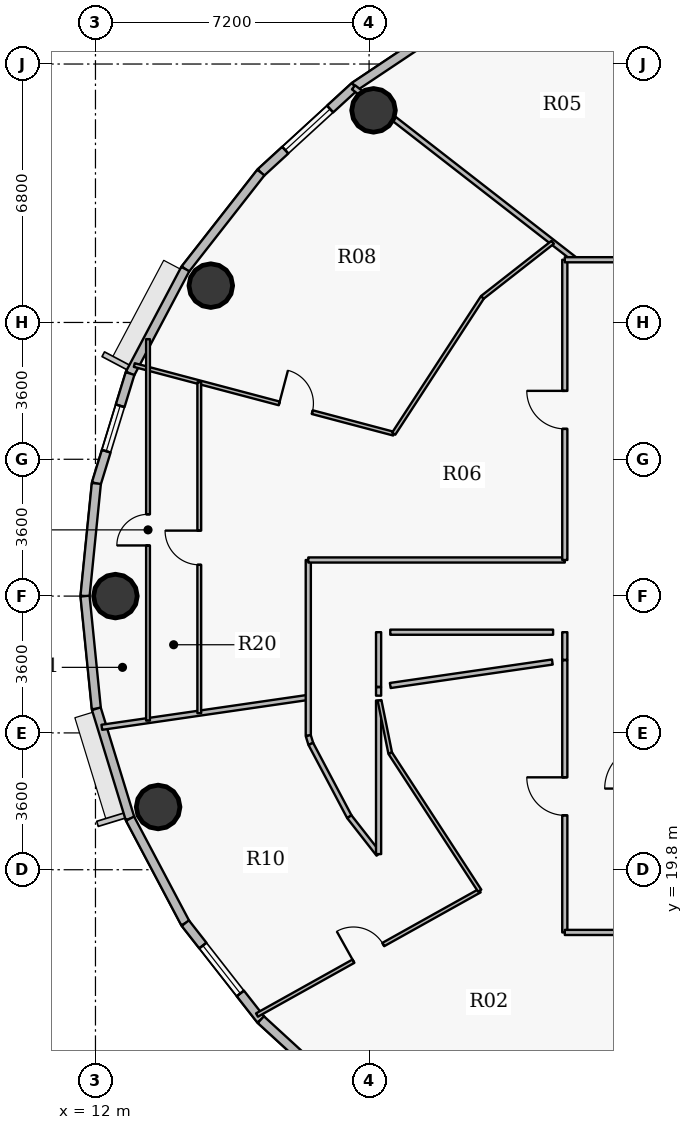
"""IFC4 building model, lengths in metres.
Left out: names, types, materials, properties, quantities, classifications, styles, units other than length and angle.
Written with IfcOpenShell. Run it as: python <this file> out.ifc"""

import sys

from ifc_helpers import new_model, si_unit, direction, frame, frame_2d, origin, origin_2d, place, context, subcontext, project, spatial, rectangle, hollow_circle, extrude, source, transform, mapped, element, fill, save


model = new_model("IFC4")
c1 = context("Model", 3, precision=1e-05, world=origin(), true_north=direction((0.0, 1.0)))
c2 = subcontext(c1, "Body", "Model", "MODEL_VIEW")
j1 = project(units=[si_unit("LENGTHUNIT", "METRE"), si_unit("PLANEANGLEUNIT", "RADIAN")], contexts=[c1])
p1 = place(None, origin())
s1 = spatial("IfcSite", under=j1, at=p1, CompositionType="ELEMENT")
p2 = place(p1, origin())
s2 = spatial("IfcBuilding", under=s1, at=p2, CompositionType="ELEMENT")
p3 = place(p2, frame((0.0, 0.0, 236.55)))
s3 = spatial("IfcBuildingStorey", under=s2, at=p3, CompositionType="ELEMENT", Elevation=236.55)
for number, where, z_axis, x_axis in (
    (1, (19.317, 39.781, 0.0), (0.0, 0.0, 1.0), (1.0, 0.0, 0.0)),
    (2, (15.035, 35.169, 0.0), (0.0, 0.0, 1.0), (1.0, 0.0, 0.0)),
    (3, (12.525, 27.0, 0.0), (0.0, 0.0, 1.0), (1.0, 0.0, 0.0)),
    (4, (13.649, 21.451, 0.0), (0.0, 0.0, 1.0), (1.0, 0.0, 0.0)),
):
    element("IfcColumn", number, at=place(p3, frame(where, z_axis=z_axis, x_axis=x_axis)), inside=s3, PredefinedType="COLUMN", context=c2, shape_type="SweptSolid", body=[
        extrude(hollow_circle(Radius=0.575, WallThickness=0.036, at=origin_2d()), origin(), (0.0, 0.0, 1.0), 3.75),
    ])
p4 = place(p3, frame((18.824, 40.411, 0.0), z_axis=(0.0, 0.0, 1.0), x_axis=(0.831262496074, 0.555880079352, 0.0)))
e5 = element("IfcWall", 5, at=p4, inside=s3, PredefinedType="SOLIDWALL", context=c2, shape_type="SweptSolid", body=[
    extrude(rectangle(XDim=3.484, YDim=0.24, at=frame_2d((1.742, 0.0))), origin(), (0.0, 0.0, 1.0), 3.5),
])
p5 = place(p3, frame((16.352, 38.145, 0.0), z_axis=(0.0, 0.0, 1.0), x_axis=(0.737123922599, 0.675757591694, 0.0)))
e6 = element("IfcWall", 6, at=p5, inside=s3, PredefinedType="SOLIDWALL", context=c2, shape_type="SweptSolid", body=[
    extrude(rectangle(XDim=3.354, YDim=0.24, at=frame_2d((1.677, 0.0))), origin(), (0.0, 0.0, 1.0), 3.5),
])
p6 = place(p5, frame((0.873, 0.0, 0.9)))
e7 = element("IfcOpeningElement", 7, at=p6, cuts=e6, PredefinedType="OPENING", context=c2, shape_type="SweptSolid", body=[
    extrude(rectangle(XDim=1.6, YDim=1.75, at=origin_2d()), frame((0.8, 0.13, 0.875), z_axis=(0.0, -1.0, 0.0), x_axis=(1.0, 0.0, 0.0)), (0.0, 0.0, 1.0), 0.26),
])
p7 = place(p3, frame((14.364, 35.605, 0.0), z_axis=(0.0, 0.0, 1.0), x_axis=(0.616312344705, 0.787501805562, 0.0)))
e8 = element("IfcWall", 8, at=p7, inside=s3, PredefinedType="SOLIDWALL", context=c2, shape_type="SweptSolid", body=[
    extrude(rectangle(XDim=3.225, YDim=0.24, at=frame_2d((1.612, 0.0))), origin(), (0.0, 0.0, 1.0), 3.5),
])
p8 = place(p3, frame((12.91, 32.856, 0.0), z_axis=(0.0, 0.0, 1.0), x_axis=(0.46766049993, 0.883908172157, 0.0)))
e9 = element("IfcWall", 9, at=p8, inside=s3, PredefinedType="SOLIDWALL", context=c2, shape_type="SweptSolid", body=[
    extrude(rectangle(XDim=3.11, YDim=0.24, at=frame_2d((1.555, 0.0))), origin(), (0.0, 0.0, 1.0), 3.5),
])
p9 = place(p3, frame((12.023, 29.964, 0.0), z_axis=(0.0, 0.0, 1.0), x_axis=(0.293132907334, 0.95607170162, 0.0)))
e10 = element("IfcWall", 10, at=p9, inside=s3, PredefinedType="SOLIDWALL", context=c2, shape_type="SweptSolid", body=[
    extrude(rectangle(XDim=3.025, YDim=0.24, at=frame_2d((1.512, 0.0))), origin(), (0.0, 0.0, 1.0), 3.5),
])
p10 = place(p9, frame((0.887, 0.0, 0.9)))
e11 = element("IfcOpeningElement", 11, at=p10, cuts=e10, PredefinedType="OPENING", context=c2, shape_type="SweptSolid", body=[
    extrude(rectangle(XDim=1.25, YDim=1.65, at=origin_2d()), frame((0.625, 0.13, 0.825), z_axis=(0.0, -1.0, 0.0), x_axis=(1.0, 0.0, 0.0)), (0.0, 0.0, 1.0), 0.26),
])
for number, where, z_axis, x_axis in (
    (12, (11.725, 27.0, 0.0), (0.0, 0.0, 1.0), (0.1, 0.995, 0.0)),
    (13, (12.023, 24.036, 0.0), (0.0, 0.0, 1.0), (-0.1, 0.995, 0.0)),
):
    element("IfcWall", number, at=place(p3, frame(where, z_axis=z_axis, x_axis=x_axis)), inside=s3, PredefinedType="SOLIDWALL", context=c2, shape_type="SweptSolid", body=[
        extrude(rectangle(XDim=2.979, YDim=0.24, at=frame_2d((1.489, 0.0))), origin(), (0.0, 0.0, 1.0), 3.5),
    ])
p11 = place(p3, frame((12.91, 21.144, 0.0), z_axis=(0.0, 0.0, 1.0), x_axis=(-0.293132907334, 0.95607170162, 0.0)))
e14 = element("IfcWall", 14, at=p11, inside=s3, PredefinedType="SOLIDWALL", context=c2, shape_type="SweptSolid", body=[
    extrude(rectangle(XDim=3.025, YDim=0.24, at=frame_2d((1.512, 0.0))), origin(), (0.0, 0.0, 1.0), 3.5),
])
p12 = place(p3, frame((14.364, 18.395, 0.0), z_axis=(0.0, 0.0, 1.0), x_axis=(-0.46766049993, 0.883908172157, 0.0)))
e15 = element("IfcWall", 15, at=p12, inside=s3, PredefinedType="SOLIDWALL", context=c2, shape_type="SweptSolid", body=[
    extrude(rectangle(XDim=3.11, YDim=0.24, at=frame_2d((1.555, 0.0))), origin(), (0.0, 0.0, 1.0), 3.5),
])
p13 = place(p3, frame((16.352, 15.855, 0.0), z_axis=(0.0, 0.0, 1.0), x_axis=(-0.616312344705, 0.787501805562, 0.0)))
e16 = element("IfcWall", 16, at=p13, inside=s3, PredefinedType="SOLIDWALL", context=c2, shape_type="SweptSolid", body=[
    extrude(rectangle(XDim=3.225, YDim=0.24, at=frame_2d((1.612, 0.0))), origin(), (0.0, 0.0, 1.0), 3.5),
])
p14 = place(p13, frame((0.876, 0.0, 0.9)))
e17 = element("IfcOpeningElement", 17, at=p14, cuts=e16, PredefinedType="OPENING", context=c2, shape_type="SweptSolid", body=[
    extrude(rectangle(XDim=1.6, YDim=1.75, at=origin_2d()), frame((0.8, 0.13, 0.875), z_axis=(0.0, -1.0, 0.0), x_axis=(1.0, 0.0, 0.0)), (0.0, 0.0, 1.0), 0.26),
])
p15 = place(p3, frame((18.824, 13.589, 0.0), z_axis=(0.0, 0.0, 1.0), x_axis=(-0.737123922599, 0.675757591694, 0.0)))
e18 = element("IfcWall", 18, at=p15, inside=s3, PredefinedType="SOLIDWALL", context=c2, shape_type="SweptSolid", body=[
    extrude(rectangle(XDim=3.354, YDim=0.24, at=frame_2d((1.677, 0.0))), origin(), (0.0, 0.0, 1.0), 3.5),
])
p16 = place(p3, frame((12.167, 23.548, 0.0), z_axis=(0.0, 0.0, 1.0), x_axis=(0.989672764262, 0.143345106921, 0.0)))
e19 = element("IfcWall", 19, at=p16, inside=s3, PredefinedType="PARTITIONING", context=c2, shape_type="SweptSolid", body=[
    extrude(rectangle(XDim=5.489, YDim=0.135, at=frame_2d((2.745, 0.0))), origin(), (0.0, 0.0, 1.0), 2.985),
])
p17 = place(p3, frame((13.022, 33.079, 0.0), z_axis=(0.0, 0.0, 1.0), x_axis=(0.966904841433, -0.255137272097, 0.0)))
e20 = element("IfcWall", 20, at=p17, inside=s3, PredefinedType="PARTITIONING", context=c2, shape_type="SweptSolid", body=[
    extrude(rectangle(XDim=0.373, YDim=0.1, at=frame_2d((0.187, 0.0))), origin(), (0.0, 0.0, 1.0), 3.5),
])
p18 = place(p3, frame((13.392, 32.981, 0.0), z_axis=(0.0, 0.0, 1.0), x_axis=(0.966739802164, -0.255761910595, 0.0)))
e21 = element("IfcWall", 21, at=p18, inside=s3, PredefinedType="PARTITIONING", context=c2, shape_type="SweptSolid", body=[
    extrude(rectangle(XDim=6.677, YDim=0.1, at=frame_2d((3.339, 0.0))), origin(), (0.0, 0.0, 1.0), 2.985),
])
p19 = place(p18, frame((3.561, 0.0, 0.0)))
e22 = element("IfcOpeningElement", 22, at=p19, cuts=e21, PredefinedType="OPENING", context=c2, shape_type="SweptSolid", body=[
    extrude(rectangle(XDim=0.9, YDim=2.1, at=origin_2d()), frame((0.45, 0.06, 1.05), z_axis=(0.0, -1.0, 0.0), x_axis=(1.0, 0.0, 0.0)), (0.0, 0.0, 1.0), 0.12),
])
p20 = place(p3, frame((13.383, 23.724, 0.0), z_axis=(0.0, 0.0, 1.0), x_axis=(0.0, 1.0, 0.0)))
e23 = element("IfcWall", 23, at=p20, inside=s3, PredefinedType="PARTITIONING", context=c2, shape_type="SweptSolid", body=[
    extrude(rectangle(XDim=10.037, YDim=0.1, at=frame_2d((5.019, 0.0))), origin(), (0.0, 0.0, 1.0), 2.935),
])
p21 = place(p20, frame((4.608, 0.0, 0.0)))
e24 = element("IfcOpeningElement", 24, at=p21, cuts=e23, PredefinedType="OPENING", context=c2, shape_type="SweptSolid", body=[
    extrude(rectangle(XDim=0.82, YDim=2.1, at=origin_2d()), frame((0.41, 0.06, 1.05), z_axis=(0.0, -1.0, 0.0), x_axis=(1.0, 0.0, 0.0)), (0.0, 0.0, 1.0), 0.12),
])
p22 = place(p3, frame((14.732, 23.919, 0.0), z_axis=(0.0, 0.0, 1.0), x_axis=(0.0, 1.0, 0.0)))
e25 = element("IfcWall", 25, at=p22, inside=s3, PredefinedType="PARTITIONING", context=c2, shape_type="SweptSolid", body=[
    extrude(rectangle(XDim=8.708, YDim=0.1, at=frame_2d((4.354, 0.0))), origin(), (0.0, 0.0, 1.0), 2.935),
])
p23 = place(p22, frame((3.904, 0.0, 0.0)))
e26 = element("IfcOpeningElement", 26, at=p23, cuts=e25, PredefinedType="OPENING", context=c2, shape_type="SweptSolid", body=[
    extrude(rectangle(XDim=0.9, YDim=2.1, at=origin_2d()), frame((0.45, 0.06, 1.05), z_axis=(0.0, -1.0, 0.0), x_axis=(1.0, 0.0, 0.0)), (0.0, 0.0, 1.0), 0.12),
])
p24 = place(p3, frame((16.25, 15.977, 0.0), z_axis=(0.0, 0.0, 1.0), x_axis=(0.87319302211, 0.487374543999, 0.0)))
e27 = element("IfcWall", 27, at=p24, inside=s3, PredefinedType="PARTITIONING", context=c2, shape_type="SweptSolid", body=[
    extrude(rectangle(XDim=6.712, YDim=0.1, at=frame_2d((3.356, 0.0))), origin(), (0.0, 0.0, 1.0), 2.985),
])
p25 = place(p24, frame((2.906, 0.0, 0.0)))
e28 = element("IfcOpeningElement", 28, at=p25, cuts=e27, PredefinedType="OPENING", context=c2, shape_type="SweptSolid", body=[
    extrude(rectangle(XDim=0.9, YDim=2.1, at=origin_2d()), frame((0.45, 0.06, 1.05), z_axis=(0.0, -1.0, 0.0), x_axis=(1.0, 0.0, 0.0)), (0.0, 0.0, 1.0), 0.12),
])
p26 = place(p3, frame((17.6, 23.328, 0.0), z_axis=(0.0, 0.0, 1.0), x_axis=(0.0, 1.0, 0.0)))
e29 = element("IfcWall", 29, at=p26, inside=s3, PredefinedType="PARTITIONING", context=c2, shape_type="SweptSolid", body=[
    extrude(rectangle(XDim=4.622, YDim=0.135, at=frame_2d((2.311, 0.0))), origin(), (0.0, 0.0, 1.0), 2.935),
])
p27 = place(p3, frame((17.6, 23.328, 0.0), z_axis=(0.0, 0.0, 1.0), x_axis=(0.292875000845, -0.956150738053, 0.0)))
e30 = element("IfcWall", 30, at=p27, inside=s3, PredefinedType="PARTITIONING", context=c2, shape_type="SweptSolid", body=[
    extrude(rectangle(XDim=0.227, YDim=0.135, at=frame_2d((0.113, 0.0))), origin(), (0.0, 0.0, 1.0), 3.5),
])
p28 = place(p3, frame((17.6, 27.95, 0.0), z_axis=(0.0, 0.0, 1.0), x_axis=(1.0, 0.0, 0.0)))
e31 = element("IfcWall", 31, at=p28, inside=s3, PredefinedType="PARTITIONING", context=c2, shape_type="SweptSolid", body=[
    extrude(rectangle(XDim=6.75, YDim=0.135, at=frame_2d((3.375, 0.0))), origin(), (0.0, 0.0, 1.0), 3.5),
])
p29 = place(p3, frame((17.667, 23.111, 0.0), z_axis=(0.0, 0.0, 1.0), x_axis=(0.467675622269, -0.883900171024, 0.0)))
e32 = element("IfcWall", 32, at=p29, inside=s3, PredefinedType="PARTITIONING", context=c2, shape_type="SweptSolid", body=[
    extrude(rectangle(XDim=2.168, YDim=0.135, at=frame_2d((1.084, 0.0))), origin(), (0.0, 0.0, 1.0), 2.935),
])
p30 = place(p3, frame((18.681, 21.194, 0.0), z_axis=(0.0, 0.0, 1.0), x_axis=(0.616239706802, -0.787558647823, 0.0)))
e33 = element("IfcWall", 33, at=p30, inside=s3, PredefinedType="PARTITIONING", context=c2, shape_type="SweptSolid", body=[
    extrude(rectangle(XDim=1.248, YDim=0.135, at=frame_2d((0.624, 0.0))), origin(), (0.0, 0.0, 1.0), 3.5),
])
p31 = place(p3, frame((18.791, 40.387, 0.0), z_axis=(0.0, 0.0, 1.0), x_axis=(0.789302404173, -0.614004653701, 0.0)))
e34 = element("IfcWall", 34, at=p31, inside=s3, PredefinedType="PARTITIONING", context=c2, shape_type="SweptSolid", body=[
    extrude(rectangle(XDim=7.39, YDim=0.135, at=frame_2d((3.695, 0.0))), origin(), (0.0, 0.0, 1.0), 2.935),
])
p32 = place(p3, frame((19.45, 20.211, 0.0), z_axis=(0.0, 0.0, 1.0), x_axis=(0.0, 1.0, 0.0)))
e35 = element("IfcWall", 35, at=p32, inside=s3, PredefinedType="PARTITIONING", context=c2, shape_type="SweptSolid", body=[
    extrude(rectangle(XDim=4.042, YDim=0.135, at=frame_2d((2.021, 0.0))), origin(), (0.0, 0.0, 1.0), 2.935),
])
p33 = place(p3, frame((19.45, 24.38, 0.0), z_axis=(0.0, 0.0, 1.0), x_axis=(0.0, 1.0, 0.0)))
e36 = element("IfcWall", 36, at=p33, inside=s3, PredefinedType="PARTITIONING", context=c2, shape_type="SweptSolid", body=[
    extrude(rectangle(XDim=0.223, YDim=0.135, at=frame_2d((0.111, 0.0))), origin(), (0.0, 0.0, 1.0), 3.5),
])
p34 = place(p3, frame((19.475, 24.256, 0.0), z_axis=(0.0, 0.0, 1.0), x_axis=(0.198203790622, -0.980160832406, 0.0)))
e37 = element("IfcWall", 37, at=p34, inside=s3, PredefinedType="PARTITIONING", context=c2, shape_type="SweptSolid", body=[
    extrude(rectangle(XDim=1.417, YDim=0.1, at=frame_2d((0.708, 0.0))), origin(), (0.0, 0.0, 1.0), 2.935),
])
p35 = place(p3, frame((19.756, 22.867, 0.0), z_axis=(0.0, 0.0, 1.0), x_axis=(0.545441385955, -0.83814896915, 0.0)))
e38 = element("IfcWall", 38, at=p35, inside=s3, PredefinedType="PARTITIONING", context=c2, shape_type="SweptSolid", body=[
    extrude(rectangle(XDim=4.318, YDim=0.1, at=frame_2d((2.159, 0.0))), origin(), (0.0, 0.0, 1.0), 2.935),
])
p36 = place(p3, frame((19.847, 31.273, 0.0), z_axis=(0.0, 0.0, 1.0), x_axis=(0.545399280946, 0.83817636828, 0.0)))
e39 = element("IfcWall", 39, at=p36, inside=s3, PredefinedType="PARTITIONING", context=c2, shape_type="SweptSolid", body=[
    extrude(rectangle(XDim=4.28, YDim=0.1, at=frame_2d((2.14, 0.0))), origin(), (0.0, 0.0, 1.0), 2.935),
])
p37 = place(p3, frame((22.182, 34.861, 0.0), z_axis=(0.0, 0.0, 1.0), x_axis=(0.78737344739, 0.616476320994, 0.0)))
e40 = element("IfcWall", 40, at=p37, inside=s3, PredefinedType="PARTITIONING", context=c2, shape_type="SweptSolid", body=[
    extrude(rectangle(XDim=2.35, YDim=0.1, at=frame_2d((1.175, 0.0))), origin(), (0.0, 0.0, 1.0), 2.935),
])
p38 = place(p3, frame((22.747, 11.154, 0.0), z_axis=(0.0, 0.0, 1.0), x_axis=(0.641565789242, 0.767068013982, 0.0)))
e41 = element("IfcWall", 41, at=p38, inside=s3, PredefinedType="PARTITIONING", context=c2, shape_type="SweptSolid", body=[
    extrude(rectangle(XDim=6.167, YDim=0.1, at=frame_2d((3.083, 0.0))), origin(), (0.0, 0.0, 1.0), 2.985),
])
p39 = place(p38, frame((2.633, 0.0, 0.0)))
e42 = element("IfcOpeningElement", 42, at=p39, cuts=e41, PredefinedType="OPENING", context=c2, shape_type="SweptSolid", body=[
    extrude(rectangle(XDim=0.9, YDim=2.1, at=origin_2d()), frame((0.45, 0.06, 1.05), z_axis=(0.0, -1.0, 0.0), x_axis=(1.0, 0.0, 0.0)), (0.0, 0.0, 1.0), 0.12),
])
p40 = place(p3, frame((24.35, 18.15, 0.0), z_axis=(0.0, 0.0, 1.0), x_axis=(0.0, 1.0, 0.0)))
e43 = element("IfcWall", 43, at=p40, inside=s3, PredefinedType="PARTITIONING", context=c2, shape_type="SweptSolid", body=[
    extrude(rectangle(XDim=7.163, YDim=0.135, at=frame_2d((3.581, 0.0))), origin(), (0.0, 0.0, 1.0), 2.935),
])
p41 = place(p40, frame((3.081, 0.0, 0.0)))
e44 = element("IfcOpeningElement", 44, at=p41, cuts=e43, PredefinedType="OPENING", context=c2, shape_type="SweptSolid", body=[
    extrude(rectangle(XDim=1.0, YDim=2.15, at=origin_2d()), frame((0.5, 0.078, 1.075), z_axis=(0.0, -1.0, 0.0), x_axis=(1.0, 0.0, 0.0)), (0.0, 0.0, 1.0), 0.155),
])
p42 = place(p3, frame((24.35, 18.15, 0.0), z_axis=(0.0, 0.0, 1.0), x_axis=(1.0, 0.0, 0.0)))
e45 = element("IfcWall", 45, at=p42, inside=s3, PredefinedType="PARTITIONING", context=c2, shape_type="SweptSolid", body=[
    extrude(rectangle(XDim=23.85, YDim=0.135, at=frame_2d((11.925, 0.0))), origin(), (0.0, 0.0, 1.0), 2.935),
])
p43 = place(p42, frame((14.838, 0.0, 0.0)))
e46 = element("IfcOpeningElement", 46, at=p43, cuts=e45, PredefinedType="OPENING", context=c2, shape_type="SweptSolid", body=[
    extrude(rectangle(XDim=1.0, YDim=2.15, at=origin_2d()), frame((0.5, 0.078, 1.075), z_axis=(0.0, -1.0, 0.0), x_axis=(1.0, 0.0, 0.0)), (0.0, 0.0, 1.0), 0.155),
])
p44 = place(p42, frame((21.472, 0.0, 0.0)))
e47 = element("IfcOpeningElement", 47, at=p44, cuts=e45, PredefinedType="OPENING", context=c2, shape_type="SweptSolid", body=[
    extrude(rectangle(XDim=1.0, YDim=2.15, at=origin_2d()), frame((0.5, 0.078, 1.075), z_axis=(0.0, -1.0, 0.0), x_axis=(1.0, 0.0, 0.0)), (0.0, 0.0, 1.0), 0.155),
])
p45 = place(p3, frame((24.35, 27.95, 0.0), z_axis=(0.0, 0.0, 1.0), x_axis=(0.0, 1.0, 0.0)))
e48 = element("IfcWall", 48, at=p45, inside=s3, PredefinedType="PARTITIONING", context=c2, shape_type="SweptSolid", body=[
    extrude(rectangle(XDim=7.9, YDim=0.135, at=frame_2d((3.95, 0.0))), origin(), (0.0, 0.0, 1.0), 2.935),
])
p46 = place(p45, frame((3.45, 0.0, 0.0)))
e49 = element("IfcOpeningElement", 49, at=p46, cuts=e48, PredefinedType="OPENING", context=c2, shape_type="SweptSolid", body=[
    extrude(rectangle(XDim=1.0, YDim=2.15, at=origin_2d()), frame((0.5, 0.078, 1.075), z_axis=(0.0, -1.0, 0.0), x_axis=(1.0, 0.0, 0.0)), (0.0, 0.0, 1.0), 0.155),
])
p47 = place(p3, frame((24.35, 35.85, 0.0), z_axis=(0.0, 0.0, 1.0), x_axis=(1.0, 0.0, 0.0)))
e50 = element("IfcWall", 50, at=p47, inside=s3, PredefinedType="PARTITIONING", context=c2, shape_type="SweptSolid", body=[
    extrude(rectangle(XDim=26.218, YDim=0.135, at=frame_2d((13.109, 0.0))), origin(), (0.0, 0.0, 1.0), 2.935),
])
p48 = place(p47, frame((3.172, 0.0, 0.0)))
e51 = element("IfcOpeningElement", 51, at=p48, cuts=e50, PredefinedType="OPENING", context=c2, shape_type="SweptSolid", body=[
    extrude(rectangle(XDim=1.0, YDim=2.15, at=origin_2d()), frame((0.5, 0.078, 1.075), z_axis=(0.0, -1.0, 0.0), x_axis=(1.0, 0.0, 0.0)), (0.0, 0.0, 1.0), 0.155),
])
p49 = place(p47, frame((18.306, 0.0, 0.0)))
e52 = element("IfcOpeningElement", 52, at=p49, cuts=e50, PredefinedType="OPENING", context=c2, shape_type="SweptSolid", body=[
    extrude(rectangle(XDim=1.0, YDim=2.15, at=origin_2d()), frame((0.5, 0.078, 1.075), z_axis=(0.0, -1.0, 0.0), x_axis=(1.0, 0.0, 0.0)), (0.0, 0.0, 1.0), 0.155),
])
p50 = place(p3, frame((19.45, 26.05, 0.0), z_axis=(0.0, 0.0, 1.0), x_axis=(0.0, -1.0, 0.0)))
e53 = element("IfcWall", 53, at=p50, inside=s3, PredefinedType="PARTITIONING", context=c2, shape_type="SweptSolid", body=[
    extrude(rectangle(XDim=1.437, YDim=0.135, at=frame_2d((0.719, 0.0))), origin(), (0.0, 0.0, 1.0), 3.5),
])
p51 = place(p3, frame((24.35, 25.323, 0.0), z_axis=(0.0, 0.0, 1.0), x_axis=(0.0, 1.0, 0.0)))
e54 = element("IfcWall", 54, at=p51, inside=s3, PredefinedType="PARTITIONING", context=c2, shape_type="SweptSolid", body=[
    extrude(rectangle(XDim=0.728, YDim=0.135, at=frame_2d((0.364, 0.0))), origin(), (0.0, 0.0, 1.0), 3.5),
])
p52 = place(p3, frame((24.042, 26.05, 0.0), z_axis=(0.0, 0.0, 1.0), x_axis=(-1.0, 0.0, 0.0)))
e55 = element("IfcWall", 55, at=p52, inside=s3, PredefinedType="PARTITIONING", context=c2, shape_type="SweptSolid", body=[
    extrude(rectangle(XDim=4.285, YDim=0.135, at=frame_2d((2.143, 0.0))), origin(), (0.0, 0.0, 1.0), 3.5),
])
p53 = place(p3, frame((19.758, 24.647, 0.0), z_axis=(0.0, 0.0, 1.0), x_axis=(0.989666541967, 0.143388059861, 0.0)))
e56 = element("IfcWall", 56, at=p53, inside=s3, PredefinedType="PARTITIONING", context=c2, shape_type="SweptSolid", body=[
    extrude(rectangle(XDim=4.309, YDim=0.135, at=frame_2d((2.155, 0.0))), origin(), (0.0, 0.0, 1.0), 3.5),
])
m1 = source(origin(), c2, "Body", "SweptSolid", [
    extrude(rectangle(XDim=1.6, YDim=1.75, at=origin_2d()), frame((0.8, 0.03, 0.875), z_axis=(0.0, -1.0, 0.0), x_axis=(1.0, 0.0, 0.0)), (0.0, 0.0, 1.0), 0.06),
])
p54 = place(p6, origin())
e57 = element("IfcWindow", 57, at=p54, inside=s3, PartitioningType="DOUBLE_PANEL_VERTICAL", PredefinedType="WINDOW", context=c2, shape_type="MappedRepresentation", body=[
    mapped(m1, transform((0.0, 0.0, 0.0), x_axis=(1.0, 0.0, 0.0), y_axis=(0.0, 1.0, 0.0), z_axis=(0.0, 0.0, 1.0), scale=1.0)),
])
fill(e7, e57)
m2 = source(origin(), c2, "Body", "SweptSolid", [
    extrude(rectangle(XDim=1.25, YDim=1.65, at=origin_2d()), frame((0.625, 0.03, 0.825), z_axis=(0.0, -1.0, 0.0), x_axis=(1.0, 0.0, 0.0)), (0.0, 0.0, 1.0), 0.06),
])
p55 = place(p10, origin())
e58 = element("IfcWindow", 58, at=p55, inside=s3, PartitioningType="SINGLE_PANEL", PredefinedType="WINDOW", context=c2, shape_type="MappedRepresentation", body=[
    mapped(m2, transform((0.0, 0.0, 0.0), x_axis=(1.0, 0.0, 0.0), y_axis=(0.0, 1.0, 0.0), z_axis=(0.0, 0.0, 1.0), scale=1.0)),
])
fill(e11, e58)
p56 = place(p14, origin())
e59 = element("IfcWindow", 59, at=p56, inside=s3, PartitioningType="DOUBLE_PANEL_VERTICAL", PredefinedType="WINDOW", context=c2, shape_type="MappedRepresentation", body=[
    mapped(m1, transform((0.0, 0.0, 0.0), x_axis=(1.0, 0.0, 0.0), y_axis=(0.0, 1.0, 0.0), z_axis=(0.0, 0.0, 1.0), scale=1.0)),
])
fill(e17, e59)
m3 = source(origin(), c2, "Body", "SweptSolid", [
    extrude(rectangle(XDim=1.0, YDim=2.15, at=origin_2d()), frame((0.5, 0.025, 1.075), z_axis=(0.0, -1.0, 0.0), x_axis=(1.0, 0.0, 0.0)), (0.0, 0.0, 1.0), 0.05),
])
p57 = place(p46, origin())
e60 = element("IfcDoor", 60, at=p57, inside=s3, OperationType="SINGLE_SWING_RIGHT", PredefinedType="DOOR", context=c2, shape_type="MappedRepresentation", body=[
    mapped(m3, transform((0.0, 0.0, 0.0), x_axis=(1.0, 0.0, 0.0), y_axis=(0.0, 1.0, 0.0), z_axis=(0.0, 0.0, 1.0), scale=1.0)),
])
fill(e49, e60)
m4 = source(origin(), c2, "Body", "SweptSolid", [
    extrude(rectangle(XDim=0.9, YDim=2.1, at=origin_2d()), frame((0.45, 0.025, 1.05), z_axis=(0.0, -1.0, 0.0), x_axis=(1.0, 0.0, 0.0)), (0.0, 0.0, 1.0), 0.05),
])
p58 = place(p19, origin())
e61 = element("IfcDoor", 61, at=p58, inside=s3, OperationType="SINGLE_SWING_LEFT", PredefinedType="DOOR", context=c2, shape_type="MappedRepresentation", body=[
    mapped(m4, transform((0.0, 0.0, 0.0), x_axis=(1.0, 0.0, 0.0), y_axis=(0.0, 1.0, 0.0), z_axis=(0.0, 0.0, 1.0), scale=1.0)),
])
fill(e22, e61)
p59 = place(p23, origin())
e62 = element("IfcDoor", 62, at=p59, inside=s3, OperationType="SINGLE_SWING_RIGHT", PredefinedType="DOOR", context=c2, shape_type="MappedRepresentation", body=[
    mapped(m4, transform((0.0, 0.0, 0.0), x_axis=(1.0, 0.0, 0.0), y_axis=(0.0, 1.0, 0.0), z_axis=(0.0, 0.0, 1.0), scale=1.0)),
])
fill(e26, e62)
m5 = source(origin(), c2, "Body", "SweptSolid", [
    extrude(rectangle(XDim=0.82, YDim=2.1, at=origin_2d()), frame((0.41, 0.025, 1.05), z_axis=(0.0, -1.0, 0.0), x_axis=(1.0, 0.0, 0.0)), (0.0, 0.0, 1.0), 0.05),
])
p60 = place(p21, origin())
e63 = element("IfcDoor", 63, at=p60, inside=s3, OperationType="SINGLE_SWING_LEFT", PredefinedType="DOOR", context=c2, shape_type="MappedRepresentation", body=[
    mapped(m5, transform((0.0, 0.0, 0.0), x_axis=(1.0, 0.0, 0.0), y_axis=(0.0, 1.0, 0.0), z_axis=(0.0, 0.0, 1.0), scale=1.0)),
])
fill(e24, e63)
p61 = place(p41, origin())
e64 = element("IfcDoor", 64, at=p61, inside=s3, OperationType="SINGLE_SWING_RIGHT", PredefinedType="DOOR", context=c2, shape_type="MappedRepresentation", body=[
    mapped(m3, transform((0.0, 0.0, 0.0), x_axis=(1.0, 0.0, 0.0), y_axis=(0.0, 1.0, 0.0), z_axis=(0.0, 0.0, 1.0), scale=1.0)),
])
fill(e44, e64)
p62 = place(p25, origin())
e65 = element("IfcDoor", 65, at=p62, inside=s3, OperationType="SINGLE_SWING_LEFT", PredefinedType="DOOR", context=c2, shape_type="MappedRepresentation", body=[
    mapped(m4, transform((0.0, 0.0, 0.0), x_axis=(1.0, 0.0, 0.0), y_axis=(0.0, 1.0, 0.0), z_axis=(0.0, 0.0, 1.0), scale=1.0)),
])
fill(e28, e65)
save(model, sys.argv[1])
